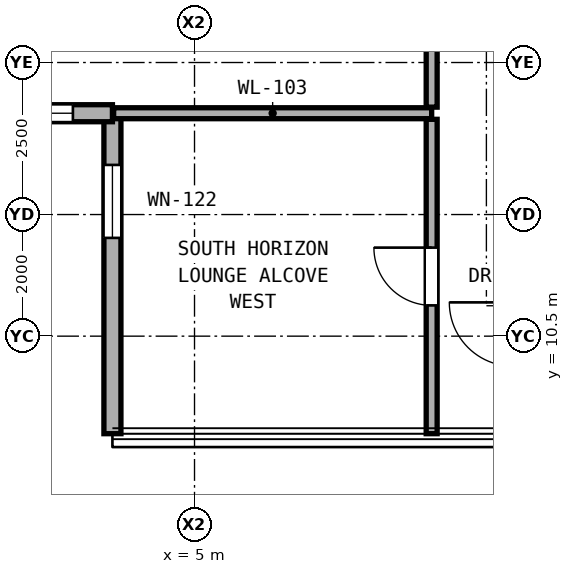
"""IFC4 building model, lengths in metres.
Left out: names, types, materials, properties, quantities, classifications, styles, units other than length and angle.
Written with IfcOpenShell. Run it as: python <this file> out.ifc"""

import sys

from ifc_helpers import new_model, si_unit, direction, frame, frame_2d, origin, place, context, subcontext, project, spatial, rectangle, extrude, element, fill, save


model = new_model("IFC4")
c1 = context("Model", 3, precision=1e-05, world=origin(), true_north=direction((0.0, 1.0)))
c2 = subcontext(c1, "Body", "Model", "MODEL_VIEW")
j1 = project(units=[si_unit("LENGTHUNIT", "METRE"), si_unit("PLANEANGLEUNIT", "RADIAN")], contexts=[c1])
p1 = place(None, origin())
s1 = spatial("IfcSite", under=j1, at=p1, CompositionType="ELEMENT")
p2 = place(p1, origin())
s2 = spatial("IfcBuilding", under=s1, at=p2, CompositionType="ELEMENT")
p3 = place(p2, frame((0.0, 0.0, 144.5)))
s3 = spatial("IfcBuildingStorey", under=s2, at=p3, CompositionType="ELEMENT", Elevation=144.5)
p4 = place(p3, frame((3.65, 14.166, 0.0), z_axis=(0.0, 0.0, 1.0), x_axis=(0.0, -1.0, 0.0)))
e1 = element("IfcWall", 1, at=p4, inside=s3, PredefinedType="SOLIDWALL", context=c2, shape_type="SweptSolid", body=[
    extrude(rectangle(XDim=5.27, YDim=0.28, at=frame_2d((2.635, 0.0))), origin(), (0.0, 0.0, 1.0), 2.56),
])
p5 = place(p4, frame((0.85, 0.0, 0.31)))
e2 = element("IfcOpeningElement", 2, at=p5, cuts=e1, PredefinedType="OPENING", context=c2, shape_type="SweptSolid", body=[
    extrude(rectangle(XDim=1.2, YDim=2.1, at=frame_2d((0.6, 1.05))), frame((0.0, 0.15, 0.0), z_axis=(0.0, -1.0, 0.0), x_axis=(1.0, 0.0, 0.0)), (0.0, 0.0, 1.0), 0.3),
])
p6 = place(p3, frame((-1.62, 14.166, 0.0), z_axis=(0.0, 0.0, 1.0), x_axis=(1.0, 0.0, 0.0)))
e3 = element("IfcWall", 3, at=p6, inside=s3, PredefinedType="SOLIDWALL", context=c2, shape_type="SweptSolid", body=[
    extrude(rectangle(XDim=5.27, YDim=0.28, at=frame_2d((2.635, 0.0))), origin(), (0.0, 0.0, 1.0), 2.56),
])
p7 = place(p6, frame((3.52, 0.0, 0.41)))
e4 = element("IfcOpeningElement", 4, at=p7, cuts=e3, PredefinedType="OPENING", context=c2, shape_type="SweptSolid", body=[
    extrude(rectangle(XDim=1.1, YDim=2.0, at=frame_2d((0.55, 1.0))), frame((0.0, 0.15, 0.0), z_axis=(0.0, -1.0, 0.0), x_axis=(1.0, 0.0, 0.0)), (0.0, 0.0, 1.0), 0.3),
])
p8 = place(p3, frame((3.67, 14.166, 0.0), z_axis=(0.0, 0.0, 1.0), x_axis=(1.0, 0.0, 0.0)))
e5 = element("IfcWall", 5, at=p8, inside=s3, PredefinedType="PARTITIONING", context=c2, shape_type="SweptSolid", body=[
    extrude(rectangle(XDim=5.23, YDim=0.18, at=frame_2d((2.615, 0.0))), origin(), (0.0, 0.0, 1.0), 2.94),
])
p9 = place(p3, frame((8.9, 8.896, 0.0), z_axis=(0.0, 0.0, 1.0), x_axis=(0.0, 1.0, 0.0)))
e6 = element("IfcWall", 6, at=p9, inside=s3, PredefinedType="PARTITIONING", context=c2, shape_type="SweptSolid", body=[
    extrude(rectangle(XDim=5.17, YDim=0.18, at=frame_2d((2.585, 0.0))), origin(), (0.0, 0.0, 1.0), 2.94),
])
p10 = place(p9, frame((2.11, 0.0, 0.0)))
e7 = element("IfcOpeningElement", 7, at=p10, cuts=e6, PredefinedType="OPENING", context=c2, shape_type="SweptSolid", body=[
    extrude(rectangle(XDim=0.95, YDim=2.15, at=frame_2d((0.475, 1.075))), frame((0.0, 0.1, 0.0), z_axis=(0.0, -1.0, 0.0), x_axis=(1.0, 0.0, 0.0)), (0.0, 0.0, 1.0), 0.2),
])
p11 = place(p3, frame((8.9, 14.266, 0.0), z_axis=(0.0, 0.0, 1.0), x_axis=(0.0, 1.0, 0.0)))
e8 = element("IfcWall", 8, at=p11, inside=s3, PredefinedType="PARTITIONING", context=c2, shape_type="SweptSolid", body=[
    extrude(rectangle(XDim=4.329, YDim=0.18, at=frame_2d((2.165, 0.0))), origin(), (0.0, 0.0, 1.0), 2.316),
])
p12 = place(p11, frame((2.59, 0.0, 0.0)))
e9 = element("IfcOpeningElement", 9, at=p12, cuts=e8, PredefinedType="OPENING", context=c2, shape_type="SweptSolid", body=[
    extrude(rectangle(XDim=1.05, YDim=2.2, at=frame_2d((0.525, 1.1))), frame((0.0, 0.1, 0.0), z_axis=(0.0, -1.0, 0.0), x_axis=(1.0, 0.0, 0.0)), (0.0, 0.0, 1.0), 0.2),
])
p13 = place(p5, origin())
e10 = element("IfcWindow", 10, at=p13, inside=s3, PartitioningType="SINGLE_PANEL", PredefinedType="WINDOW", context=c2, shape_type="SweptSolid", body=[
    extrude(rectangle(XDim=1.2, YDim=2.1, at=frame_2d((0.6, 1.05))), frame((0.0, 0.03, 0.0), z_axis=(0.0, -1.0, 0.0), x_axis=(1.0, 0.0, 0.0)), (0.0, 0.0, 1.0), 0.06),
])
fill(e2, e10)
p14 = place(p7, origin())
e11 = element("IfcWindow", 11, at=p14, inside=s3, PartitioningType="SINGLE_PANEL", PredefinedType="WINDOW", context=c2, shape_type="SweptSolid", body=[
    extrude(rectangle(XDim=1.1, YDim=2.0, at=frame_2d((0.55, 1.0))), frame((0.0, 0.03, 0.0), z_axis=(0.0, -1.0, 0.0), x_axis=(1.0, 0.0, 0.0)), (0.0, 0.0, 1.0), 0.06),
])
fill(e4, e11)
p15 = place(p10, origin())
e12 = element("IfcDoor", 12, at=p15, inside=s3, OperationType="SINGLE_SWING_RIGHT", PredefinedType="DOOR", context=c2, shape_type="SweptSolid", body=[
    extrude(rectangle(XDim=0.95, YDim=2.15, at=frame_2d((0.475, 1.075))), frame((0.0, 0.025, 0.0), z_axis=(0.0, -1.0, 0.0), x_axis=(1.0, 0.0, 0.0)), (0.0, 0.0, 1.0), 0.05),
])
fill(e7, e12)
save(model, sys.argv[1])
